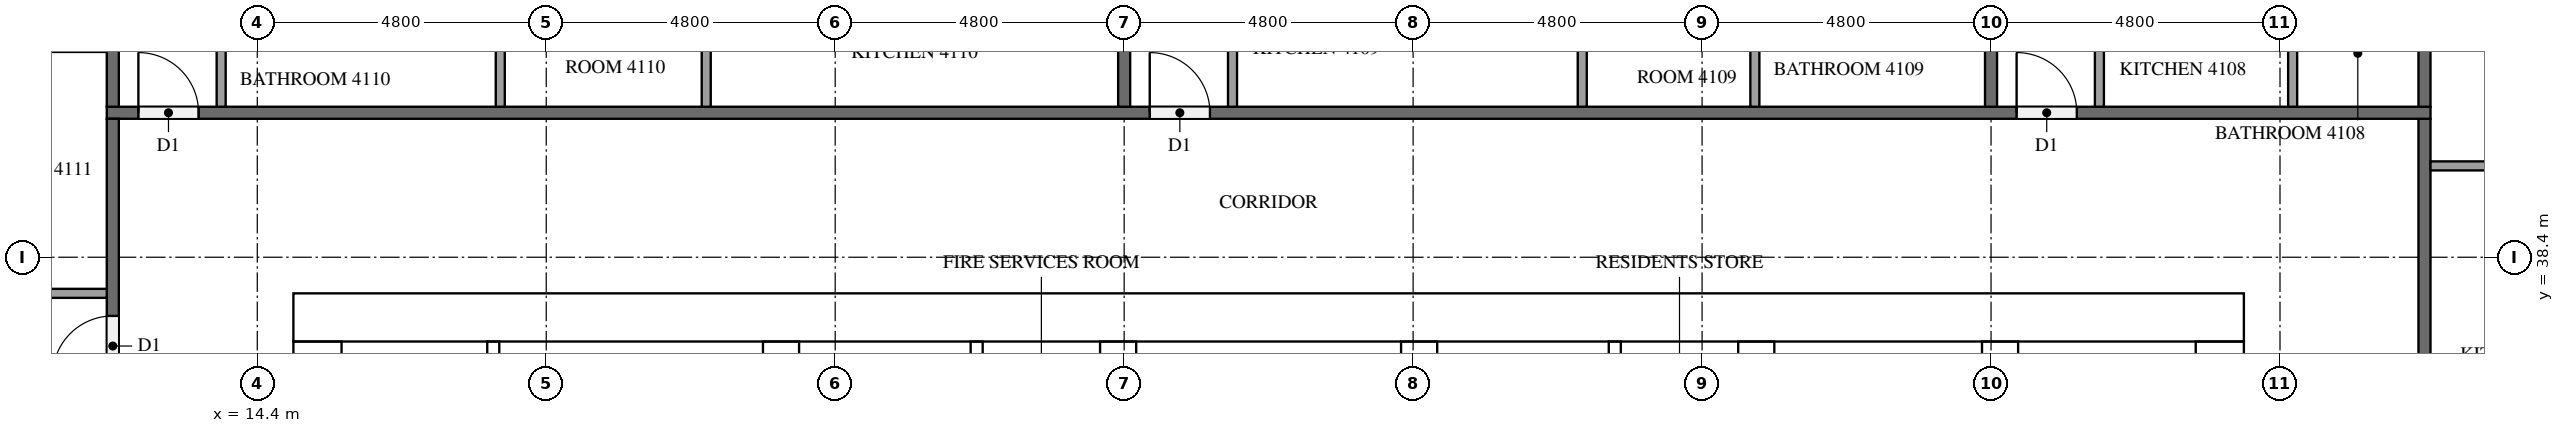
"""IFC4 building model, lengths in metres.
Left out: names, types, materials, properties, quantities, classifications, styles, units other than length and angle.
Written with IfcOpenShell. Run it as: python <this file> out.ifc"""

import sys

from ifc_helpers import new_model, si_unit, direction, frame, frame_2d, origin, place, context, subcontext, project, spatial, rectangle, extrude, element, fill, save


model = new_model("IFC4")
c1 = context("Model", 3, precision=1e-05, world=origin(), true_north=direction((0.0, 1.0)))
c2 = subcontext(c1, "Body", "Model", "MODEL_VIEW")
j1 = project(units=[si_unit("LENGTHUNIT", "METRE"), si_unit("PLANEANGLEUNIT", "RADIAN")], contexts=[c1])
p1 = place(None, origin())
s1 = spatial("IfcSite", under=j1, at=p1, CompositionType="ELEMENT")
p2 = place(p1, origin())
s2 = spatial("IfcBuilding", under=s1, at=p2, CompositionType="ELEMENT")
p3 = place(p2, frame((0.0, 0.0, 159.5)))
s3 = spatial("IfcBuildingStorey", under=s2, at=p3, CompositionType="ELEMENT", Elevation=159.5)
p4 = place(p3, frame((15.0, 37.4, 0.0), z_axis=(0.0, 0.0, 1.0), x_axis=(1.0, 0.0, 0.0)))
e1 = element("IfcWall", 1, at=p4, inside=s3, PredefinedType="SHEAR", context=c2, shape_type="SweptSolid", body=[
    extrude(rectangle(XDim=32.4, YDim=0.8, at=frame_2d((16.2, 0.0))), origin(), (0.0, 0.0, 1.0), 3.2),
])
p5 = place(p4, frame((15.3, 0.0, 0.0)))
e2 = element("IfcOpeningElement", 2, at=p5, cuts=e1, PredefinedType="OPENING", context=c2, shape_type="SweptSolid", body=[
    extrude(rectangle(XDim=1.8, YDim=2.1, at=frame_2d((0.9, 1.05))), frame((0.0, 0.41, 0.0), z_axis=(0.0, -1.0, 0.0), x_axis=(1.0, 0.0, 0.0)), (0.0, 0.0, 1.0), 0.82),
])
p6 = place(p4, frame((1.51, 0.0, 0.0)))
e3 = element("IfcOpeningElement", 3, at=p6, cuts=e1, PredefinedType="OPENING", context=c2, shape_type="SweptSolid", body=[
    extrude(rectangle(XDim=1.0, YDim=2.1, at=frame_2d((0.5, 1.05))), frame((0.0, 0.41, 0.0), z_axis=(0.0, -1.0, 0.0), x_axis=(1.0, 0.0, 0.0)), (0.0, 0.0, 1.0), 0.82),
])
p7 = place(p4, frame((5.11, 0.0, 0.0)))
e4 = element("IfcOpeningElement", 4, at=p7, cuts=e1, PredefinedType="OPENING", context=c2, shape_type="SweptSolid", body=[
    extrude(rectangle(XDim=1.0, YDim=2.1, at=frame_2d((0.5, 1.05))), frame((0.0, 0.41, 0.0), z_axis=(0.0, -1.0, 0.0), x_axis=(1.0, 0.0, 0.0)), (0.0, 0.0, 1.0), 0.82),
])
p8 = place(p3, frame((15.4, 15.8, 0.0), z_axis=(0.0, 0.0, 1.0), x_axis=(0.0, 1.0, 0.0)))
e5 = element("IfcWall", 5, at=p8, inside=s3, PredefinedType="SHEAR", context=c2, shape_type="SweptSolid", body=[
    extrude(rectangle(XDim=21.2, YDim=0.8, at=frame_2d((10.6, 0.0))), origin(), (0.0, 0.0, 1.0), 3.2),
])
p9 = place(p8, frame((4.96, 0.0, 0.0)))
e6 = element("IfcOpeningElement", 6, at=p9, cuts=e5, PredefinedType="OPENING", context=c2, shape_type="SweptSolid", body=[
    extrude(rectangle(XDim=1.2, YDim=2.1, at=frame_2d((0.6, 1.05))), frame((0.0, 0.41, 0.0), z_axis=(0.0, -1.0, 0.0), x_axis=(1.0, 0.0, 0.0)), (0.0, 0.0, 1.0), 0.82),
])
p10 = place(p3, frame((47.0, 15.8, 0.0), z_axis=(0.0, 0.0, 1.0), x_axis=(0.0, 1.0, 0.0)))
e7 = element("IfcWall", 7, at=p10, inside=s3, PredefinedType="SHEAR", context=c2, shape_type="SweptSolid", body=[
    extrude(rectangle(XDim=21.2, YDim=0.8, at=frame_2d((10.6, 0.0))), origin(), (0.0, 0.0, 1.0), 3.2),
])
p11 = place(p10, frame((10.3, 0.0, 0.0)))
e8 = element("IfcOpeningElement", 8, at=p11, cuts=e7, PredefinedType="OPENING", context=c2, shape_type="SweptSolid", body=[
    extrude(rectangle(XDim=1.2, YDim=2.1, at=frame_2d((0.6, 1.05))), frame((0.0, 0.41, 0.0), z_axis=(0.0, -1.0, 0.0), x_axis=(1.0, 0.0, 0.0)), (0.0, 0.0, 1.0), 0.82),
])
p12 = place(p3, frame((23.1, 15.8, 0.0), z_axis=(0.0, 0.0, 1.0), x_axis=(0.0, 1.0, 0.0)))
e9 = element("IfcWall", 9, at=p12, inside=s3, PredefinedType="SHEAR", context=c2, shape_type="SweptSolid", body=[
    extrude(rectangle(XDim=21.2, YDim=0.6, at=frame_2d((10.6, 0.0))), origin(), (0.0, 0.0, 1.0), 3.2),
])
p13 = place(p3, frame((39.3, 27.75, 0.0), z_axis=(0.0, 0.0, 1.0), x_axis=(0.0, 1.0, 0.0)))
e10 = element("IfcWall", 10, at=p13, inside=s3, PredefinedType="SHEAR", context=c2, shape_type="SweptSolid", body=[
    extrude(rectangle(XDim=9.25, YDim=0.6, at=frame_2d((4.625, 0.0))), origin(), (0.0, 0.0, 1.0), 3.2),
])
p14 = place(p3, frame((43.35, 27.75, 0.0), z_axis=(0.0, 0.0, 1.0), x_axis=(0.0, 1.0, 0.0)))
e11 = element("IfcWall", 11, at=p14, inside=s3, PredefinedType="SHEAR", context=c2, shape_type="SweptSolid", body=[
    extrude(rectangle(XDim=9.25, YDim=0.6, at=frame_2d((4.625, 0.0))), origin(), (0.0, 0.0, 1.0), 3.2),
])
p15 = place(p14, frame((7.65, 0.0, 0.0)))
e12 = element("IfcOpeningElement", 12, at=p15, cuts=e11, PredefinedType="OPENING", context=c2, shape_type="SweptSolid", body=[
    extrude(rectangle(XDim=1.2, YDim=2.1, at=frame_2d((0.6, 1.05))), frame((0.0, 0.31, 0.0), z_axis=(0.0, -1.0, 0.0), x_axis=(1.0, 0.0, 0.0)), (0.0, 0.0, 1.0), 0.62),
])
for number, where, z_axis, x_axis in (
    (13, (28.7, 33.85, 0.0), (0.0, 0.0, 1.0), (0.0, 1.0, 0.0)),
    (14, (33.7, 33.85, 0.0), (0.0, 0.0, 1.0), (0.0, 1.0, 0.0)),
):
    element("IfcWall", number, at=place(p3, frame(where, z_axis=z_axis, x_axis=x_axis)), inside=s3, PredefinedType="SHEAR", context=c2, shape_type="SweptSolid", body=[
        extrude(rectangle(XDim=3.15, YDim=0.6, at=frame_2d((1.575, 0.0))), origin(), (0.0, 0.0, 1.0), 3.2),
    ])
p16 = place(p3, frame((18.32, 31.55, 0.0), z_axis=(0.0, 0.0, 1.0), x_axis=(0.0, 1.0, 0.0)))
e15 = element("IfcWall", 15, at=p16, inside=s3, PredefinedType="PARTITIONING", context=c2, shape_type="SweptSolid", body=[
    extrude(rectangle(XDim=5.45, YDim=0.2, at=frame_2d((2.725, 0.0))), origin(), (0.0, 0.0, 1.0), 3.2),
])
for number, where, z_axis, x_axis in (
    (16, (26.35, 33.85, 0.0), (0.0, 0.0, 1.0), (0.0, 1.0, 0.0)),
    (17, (36.95, 33.85, 0.0), (0.0, 0.0, 1.0), (0.0, 1.0, 0.0)),
):
    element("IfcWall", number, at=place(p3, frame(where, z_axis=z_axis, x_axis=x_axis)), inside=s3, PredefinedType="PARTITIONING", context=c2, shape_type="SweptSolid", body=[
        extrude(rectangle(XDim=3.15, YDim=0.2, at=frame_2d((1.575, 0.0))), origin(), (0.0, 0.0, 1.0), 3.2),
    ])
p17 = place(p3, frame((50.4, 40.7, 0.0), z_axis=(0.0, 0.0, 1.0), x_axis=(0.0, -1.0, 0.0)))
e18 = element("IfcWall", 18, at=p17, inside=s3, PredefinedType="PARTITIONING", context=c2, shape_type="SweptSolid", body=[
    extrude(rectangle(XDim=28.6, YDim=0.2, at=frame_2d((14.3, 0.0))), origin(), (0.0, 0.0, 1.0), 3.2),
])
p18 = place(p17, frame((19.525, 0.0, 0.0)))
e19 = element("IfcOpeningElement", 19, at=p18, cuts=e18, PredefinedType="OPENING", context=c2, shape_type="SweptSolid", body=[
    extrude(rectangle(XDim=1.0, YDim=2.1, at=frame_2d((0.5, 1.05))), frame((0.0, 0.11, 0.0), z_axis=(0.0, -1.0, 0.0), x_axis=(1.0, 0.0, 0.0)), (0.0, 0.0, 1.0), 0.22),
])
p19 = place(p17, frame((17.675, 0.0, 0.0)))
e20 = element("IfcOpeningElement", 20, at=p19, cuts=e18, PredefinedType="OPENING", context=c2, shape_type="SweptSolid", body=[
    extrude(rectangle(XDim=1.0, YDim=2.1, at=frame_2d((0.5, 1.05))), frame((0.0, 0.11, 0.0), z_axis=(0.0, -1.0, 0.0), x_axis=(1.0, 0.0, 0.0)), (0.0, 0.0, 1.0), 0.22),
])
p20 = place(p17, frame((8.075, 0.0, 0.0)))
e21 = element("IfcOpeningElement", 21, at=p20, cuts=e18, PredefinedType="OPENING", context=c2, shape_type="SweptSolid", body=[
    extrude(rectangle(XDim=1.0, YDim=2.1, at=frame_2d((0.5, 1.05))), frame((0.0, 0.11, 0.0), z_axis=(0.0, -1.0, 0.0), x_axis=(1.0, 0.0, 0.0)), (0.0, 0.0, 1.0), 0.22),
])
p21 = place(p3, frame((11.9, 40.8, 0.0), z_axis=(0.0, 0.0, 1.0), x_axis=(1.0, 0.0, 0.0)))
e22 = element("IfcWall", 22, at=p21, inside=s3, PredefinedType="PARTITIONING", context=c2, shape_type="SweptSolid", body=[
    extrude(rectangle(XDim=38.6, YDim=0.2, at=frame_2d((19.3, 0.0))), origin(), (0.0, 0.0, 1.0), 3.2),
])
p22 = place(p21, frame((31.725, 0.0, 0.0)))
e23 = element("IfcOpeningElement", 23, at=p22, cuts=e22, PredefinedType="OPENING", context=c2, shape_type="SweptSolid", body=[
    extrude(rectangle(XDim=1.0, YDim=2.1, at=frame_2d((0.5, 1.05))), frame((0.0, 0.11, 0.0), z_axis=(0.0, -1.0, 0.0), x_axis=(1.0, 0.0, 0.0)), (0.0, 0.0, 1.0), 0.22),
])
p23 = place(p21, frame((17.325, 0.0, 0.0)))
e24 = element("IfcOpeningElement", 24, at=p23, cuts=e22, PredefinedType="OPENING", context=c2, shape_type="SweptSolid", body=[
    extrude(rectangle(XDim=1.0, YDim=2.1, at=frame_2d((0.5, 1.05))), frame((0.0, 0.11, 0.0), z_axis=(0.0, -1.0, 0.0), x_axis=(1.0, 0.0, 0.0)), (0.0, 0.0, 1.0), 0.22),
])
p24 = place(p21, frame((0.525, 0.0, 0.0)))
e25 = element("IfcOpeningElement", 25, at=p24, cuts=e22, PredefinedType="OPENING", context=c2, shape_type="SweptSolid", body=[
    extrude(rectangle(XDim=1.0, YDim=2.1, at=frame_2d((0.5, 1.05))), frame((0.0, 0.11, 0.0), z_axis=(0.0, -1.0, 0.0), x_axis=(1.0, 0.0, 0.0)), (0.0, 0.0, 1.0), 0.22),
])
p25 = place(p3, frame((12.0, 12.1, 0.0), z_axis=(0.0, 0.0, 1.0), x_axis=(0.0, 1.0, 0.0)))
e26 = element("IfcWall", 26, at=p25, inside=s3, PredefinedType="PARTITIONING", context=c2, shape_type="SweptSolid", body=[
    extrude(rectangle(XDim=28.6, YDim=0.2, at=frame_2d((14.3, 0.0))), origin(), (0.0, 0.0, 1.0), 3.2),
])
p26 = place(p25, frame((24.325, 0.0, 0.0)))
e27 = element("IfcOpeningElement", 27, at=p26, cuts=e26, PredefinedType="OPENING", context=c2, shape_type="SweptSolid", body=[
    extrude(rectangle(XDim=1.0, YDim=2.1, at=frame_2d((0.5, 1.05))), frame((0.0, 0.11, 0.0), z_axis=(0.0, -1.0, 0.0), x_axis=(1.0, 0.0, 0.0)), (0.0, 0.0, 1.0), 0.22),
])
p27 = place(p25, frame((22.475, 0.0, 0.0)))
e28 = element("IfcOpeningElement", 28, at=p27, cuts=e26, PredefinedType="OPENING", context=c2, shape_type="SweptSolid", body=[
    extrude(rectangle(XDim=1.0, YDim=2.1, at=frame_2d((0.5, 1.05))), frame((0.0, 0.11, 0.0), z_axis=(0.0, -1.0, 0.0), x_axis=(1.0, 0.0, 0.0)), (0.0, 0.0, 1.0), 0.22),
])
p28 = place(p25, frame((0.325, 0.0, 0.0)))
e29 = element("IfcOpeningElement", 29, at=p28, cuts=e26, PredefinedType="OPENING", context=c2, shape_type="SweptSolid", body=[
    extrude(rectangle(XDim=1.0, YDim=2.1, at=frame_2d((0.5, 1.05))), frame((0.0, 0.11, 0.0), z_axis=(0.0, -1.0, 0.0), x_axis=(1.0, 0.0, 0.0)), (0.0, 0.0, 1.0), 0.22),
])
p29 = place(p3, frame((50.4, 40.9, 0.0), z_axis=(0.0, 0.0, 1.0), x_axis=(0.0, 1.0, 0.0)))
e30 = element("IfcWall", 30, at=p29, inside=s3, PredefinedType="PARTITIONING", context=c2, shape_type="SweptSolid", body=[
    extrude(rectangle(XDim=7.0, YDim=0.2, at=frame_2d((3.5, 0.0))), origin(), (0.0, 0.0, 1.0), 3.2),
])
p30 = place(p3, frame((43.2, 47.625, 0.0), z_axis=(0.0, 0.0, 1.0), x_axis=(0.0, -1.0, 0.0)))
e31 = element("IfcWall", 31, at=p30, inside=s3, PredefinedType="PARTITIONING", context=c2, shape_type="SweptSolid", body=[
    extrude(rectangle(XDim=6.725, YDim=0.2, at=frame_2d((3.363, 0.0))), origin(), (0.0, 0.0, 1.0), 3.2),
])
for number, where, z_axis, x_axis in (
    (32, (28.8, 47.9, 0.0), (0.0, 0.0, 1.0), (0.0, -1.0, 0.0)),
    (33, (12.0, 47.9, 0.0), (0.0, 0.0, 1.0), (0.0, -1.0, 0.0)),
):
    element("IfcWall", number, at=place(p3, frame(where, z_axis=z_axis, x_axis=x_axis)), inside=s3, PredefinedType="PARTITIONING", context=c2, shape_type="SweptSolid", body=[
        extrude(rectangle(XDim=7.0, YDim=0.2, at=frame_2d((3.5, 0.0))), origin(), (0.0, 0.0, 1.0), 3.2),
    ])
p31 = place(p3, frame((50.5, 39.917, 0.0), z_axis=(0.0, 0.0, 1.0), x_axis=(1.0, 0.0, 0.0)))
e34 = element("IfcWall", 34, at=p31, inside=s3, PredefinedType="PARTITIONING", context=c2, shape_type="SweptSolid", body=[
    extrude(rectangle(XDim=2.375, YDim=0.15, at=frame_2d((1.188, 0.0))), origin(), (0.0, 0.0, 1.0), 3.2),
])
p32 = place(p3, frame((48.21, 40.9, 0.0), z_axis=(0.0, 0.0, 1.0), x_axis=(0.0, 1.0, 0.0)))
e35 = element("IfcWall", 35, at=p32, inside=s3, PredefinedType="PARTITIONING", context=c2, shape_type="SweptSolid", body=[
    extrude(rectangle(XDim=1.775, YDim=0.15, at=frame_2d((0.888, 0.0))), origin(), (0.0, 0.0, 1.0), 3.2),
])
for number, where, z_axis, x_axis in (
    (36, (45.0, 40.9, 0.0), (0.0, 0.0, 1.0), (0.0, 1.0, 0.0)),
    (37, (36.41, 40.9, 0.0), (0.0, 0.0, 1.0), (0.0, 1.0, 0.0)),
    (38, (39.277, 40.9, 0.0), (0.0, 0.0, 1.0), (0.0, 1.0, 0.0)),
):
    element("IfcWall", number, at=place(p3, frame(where, z_axis=z_axis, x_axis=x_axis)), inside=s3, PredefinedType="PARTITIONING", context=c2, shape_type="SweptSolid", body=[
        extrude(rectangle(XDim=1.925, YDim=0.15, at=frame_2d((0.962, 0.0))), origin(), (0.0, 0.0, 1.0), 3.2),
    ])
p33 = place(p3, frame((30.6, 40.9, 0.0), z_axis=(0.0, 0.0, 1.0), x_axis=(0.0, 1.0, 0.0)))
e39 = element("IfcWall", 39, at=p33, inside=s3, PredefinedType="PARTITIONING", context=c2, shape_type="SweptSolid", body=[
    extrude(rectangle(XDim=2.075, YDim=0.15, at=frame_2d((1.038, 0.0))), origin(), (0.0, 0.0, 1.0), 3.2),
])
for number, where, z_axis, x_axis in (
    (40, (18.437, 40.9, 0.0), (0.0, 0.0, 1.0), (0.0, 1.0, 0.0)),
    (41, (21.858, 40.9, 0.0), (0.0, 0.0, 1.0), (0.0, 1.0, 0.0)),
):
    element("IfcWall", number, at=place(p3, frame(where, z_axis=z_axis, x_axis=x_axis)), inside=s3, PredefinedType="PARTITIONING", context=c2, shape_type="SweptSolid", body=[
        extrude(rectangle(XDim=1.775, YDim=0.15, at=frame_2d((0.888, 0.0))), origin(), (0.0, 0.0, 1.0), 3.2),
    ])
p34 = place(p3, frame((13.8, 40.9, 0.0), z_axis=(0.0, 0.0, 1.0), x_axis=(0.0, 1.0, 0.0)))
e42 = element("IfcWall", 42, at=p34, inside=s3, PredefinedType="PARTITIONING", context=c2, shape_type="SweptSolid", body=[
    extrude(rectangle(XDim=1.925, YDim=0.15, at=frame_2d((0.962, 0.0))), origin(), (0.0, 0.0, 1.0), 3.2),
])
p35 = place(p3, frame((11.9, 37.8, 0.0), z_axis=(0.0, 0.0, 1.0), x_axis=(-1.0, 0.0, 0.0)))
e43 = element("IfcWall", 43, at=p35, inside=s3, PredefinedType="PARTITIONING", context=c2, shape_type="SweptSolid", body=[
    extrude(rectangle(XDim=3.125, YDim=0.15, at=frame_2d((1.562, 0.0))), origin(), (0.0, 0.0, 1.0), 3.2),
])
p36 = place(p5, origin())
e44 = element("IfcDoor", 44, at=p36, inside=s3, OperationType="DOUBLE_DOOR_SINGLE_SWING", PredefinedType="DOOR", context=c2, shape_type="SweptSolid", body=[
    extrude(rectangle(XDim=1.8, YDim=2.1, at=frame_2d((0.9, 1.05))), frame((0.0, 0.025, 0.0), z_axis=(0.0, -1.0, 0.0), x_axis=(1.0, 0.0, 0.0)), (0.0, 0.0, 1.0), 0.05),
])
fill(e2, e44)
p37 = place(p6, origin())
e45 = element("IfcDoor", 45, at=p37, inside=s3, OperationType="SINGLE_SWING_RIGHT", PredefinedType="DOOR", context=c2, shape_type="SweptSolid", body=[
    extrude(rectangle(XDim=1.0, YDim=2.1, at=frame_2d((0.5, 1.05))), frame((0.0, 0.025, 0.0), z_axis=(0.0, -1.0, 0.0), x_axis=(1.0, 0.0, 0.0)), (0.0, 0.0, 1.0), 0.05),
])
fill(e3, e45)
p38 = place(p7, origin())
e46 = element("IfcDoor", 46, at=p38, inside=s3, OperationType="SINGLE_SWING_LEFT", PredefinedType="DOOR", context=c2, shape_type="SweptSolid", body=[
    extrude(rectangle(XDim=1.0, YDim=2.1, at=frame_2d((0.5, 1.05))), frame((0.0, 0.025, 0.0), z_axis=(0.0, -1.0, 0.0), x_axis=(1.0, 0.0, 0.0)), (0.0, 0.0, 1.0), 0.05),
])
fill(e4, e46)
p39 = place(p22, origin())
e47 = element("IfcDoor", 47, at=p39, inside=s3, OperationType="SINGLE_SWING_LEFT", PredefinedType="DOOR", context=c2, shape_type="SweptSolid", body=[
    extrude(rectangle(XDim=1.0, YDim=2.1, at=frame_2d((0.5, 1.05))), frame((0.0, 0.025, 0.0), z_axis=(0.0, -1.0, 0.0), x_axis=(1.0, 0.0, 0.0)), (0.0, 0.0, 1.0), 0.05),
])
fill(e23, e47)
p40 = place(p23, origin())
e48 = element("IfcDoor", 48, at=p40, inside=s3, OperationType="SINGLE_SWING_LEFT", PredefinedType="DOOR", context=c2, shape_type="SweptSolid", body=[
    extrude(rectangle(XDim=1.0, YDim=2.1, at=frame_2d((0.5, 1.05))), frame((0.0, 0.025, 0.0), z_axis=(0.0, -1.0, 0.0), x_axis=(1.0, 0.0, 0.0)), (0.0, 0.0, 1.0), 0.05),
])
fill(e24, e48)
p41 = place(p24, origin())
e49 = element("IfcDoor", 49, at=p41, inside=s3, OperationType="SINGLE_SWING_LEFT", PredefinedType="DOOR", context=c2, shape_type="SweptSolid", body=[
    extrude(rectangle(XDim=1.0, YDim=2.1, at=frame_2d((0.5, 1.05))), frame((0.0, 0.025, 0.0), z_axis=(0.0, -1.0, 0.0), x_axis=(1.0, 0.0, 0.0)), (0.0, 0.0, 1.0), 0.05),
])
fill(e25, e49)
p42 = place(p26, origin())
e50 = element("IfcDoor", 50, at=p42, inside=s3, OperationType="SINGLE_SWING_LEFT", PredefinedType="DOOR", context=c2, shape_type="SweptSolid", body=[
    extrude(rectangle(XDim=1.0, YDim=2.1, at=frame_2d((0.5, 1.05))), frame((0.0, 0.025, 0.0), z_axis=(0.0, -1.0, 0.0), x_axis=(1.0, 0.0, 0.0)), (0.0, 0.0, 1.0), 0.05),
])
fill(e27, e50)
save(model, sys.argv[1])
